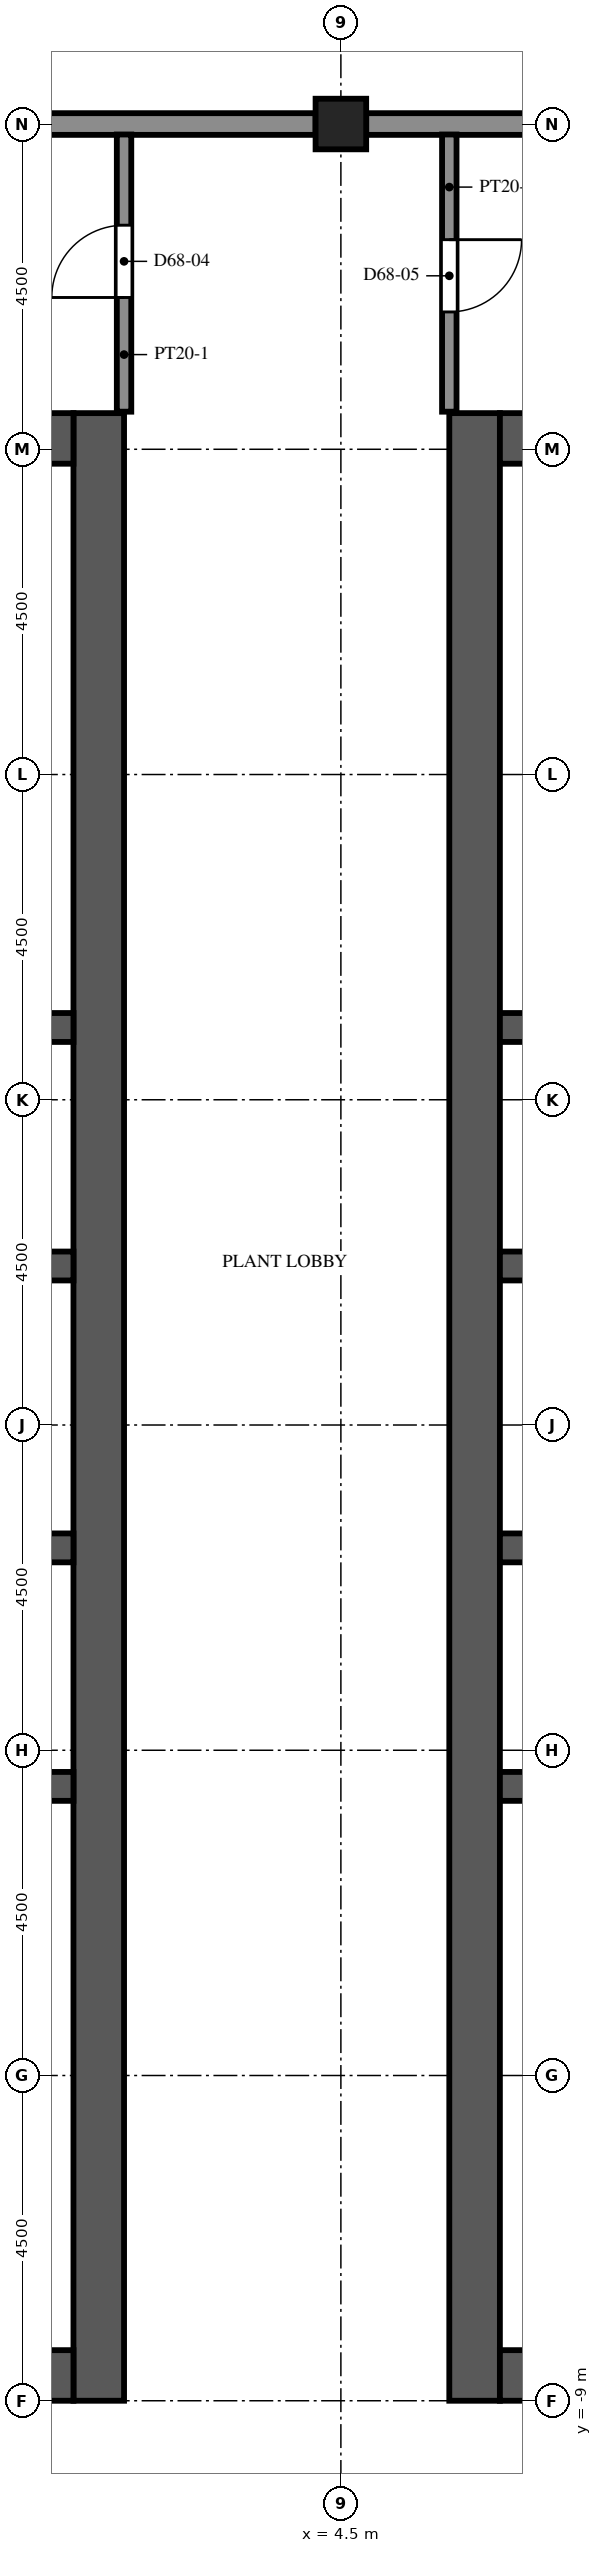
"""IFC4 building model, lengths in metres.
Left out: names, types, materials, properties, quantities, classifications, styles, units other than length and angle.
Written with IfcOpenShell. Run it as: python <this file> out.ifc"""

import sys

from ifc_helpers import new_model, si_unit, direction, frame, frame_2d, origin, origin_2d, place, context, subcontext, project, spatial, rectangle, extrude, element, fill, save


model = new_model("IFC4")
c1 = context("Model", 3, precision=1e-05, world=origin(), true_north=direction((0.0, 1.0)))
c2 = subcontext(c1, "Body", "Model", "MODEL_VIEW")
j1 = project(units=[si_unit("LENGTHUNIT", "METRE"), si_unit("PLANEANGLEUNIT", "RADIAN")], contexts=[c1])
p1 = place(None, origin())
s1 = spatial("IfcSite", under=j1, at=p1, CompositionType="ELEMENT")
p2 = place(p1, origin())
s2 = spatial("IfcBuilding", under=s1, at=p2, CompositionType="ELEMENT")
p3 = place(p2, frame((0.0, 0.0, 301.0)))
s3 = spatial("IfcBuildingStorey", under=s2, at=p3, CompositionType="ELEMENT", Elevation=301.0)
p4 = place(p3, frame((4.5, 22.5, -0.6), z_axis=(0.0, 0.0, 1.0), x_axis=(1.0, 0.0, 0.0)))
e1 = element("IfcColumn", 1, at=p4, inside=s3, PredefinedType="COLUMN", context=c2, shape_type="SweptSolid", body=[
    extrude(rectangle(XDim=0.7, YDim=0.7, at=origin_2d()), origin(), (0.0, 0.0, 1.0), 6.0),
])
p5 = place(p3, frame((1.15, -9.0, 0.0), z_axis=(0.0, 0.0, 1.0), x_axis=(0.0, 1.0, 0.0)))
e2 = element("IfcWall", 2, at=p5, inside=s3, PredefinedType="SHEAR", context=c2, shape_type="SweptSolid", body=[
    extrude(rectangle(XDim=27.5, YDim=0.7, at=frame_2d((13.75, 0.0))), origin(), (0.0, 0.0, 1.0), 5.4),
])
p6 = place(p5, frame((12.55, 0.0, 0.0)))
e3 = element("IfcOpeningElement", 3, at=p6, cuts=e2, PredefinedType="OPENING", context=c2, shape_type="SweptSolid", body=[
    extrude(rectangle(XDim=2.4, YDim=2.4, at=frame_2d((1.2, 1.2))), frame((0.0, 0.36, 0.0), z_axis=(0.0, -1.0, 0.0), x_axis=(1.0, 0.0, 0.0)), (0.0, 0.0, 1.0), 0.72),
])
p7 = place(p5, frame((5.46, 0.0, 0.0)))
e4 = element("IfcOpeningElement", 4, at=p7, cuts=e2, PredefinedType="OPENING", context=c2, shape_type="SweptSolid", body=[
    extrude(rectangle(XDim=0.968, YDim=2.1, at=frame_2d((0.484, 1.05))), frame((0.0, 0.36, 0.0), z_axis=(0.0, -1.0, 0.0), x_axis=(1.0, 0.0, 0.0)), (0.0, 0.0, 1.0), 0.72),
])
p8 = place(p5, frame((23.54, 0.0, 0.0)))
e5 = element("IfcOpeningElement", 5, at=p8, cuts=e2, PredefinedType="OPENING", context=c2, shape_type="SweptSolid", body=[
    extrude(rectangle(XDim=1.2, YDim=2.1, at=frame_2d((0.6, 1.05))), frame((0.0, 0.36, 0.0), z_axis=(0.0, -1.0, 0.0), x_axis=(1.0, 0.0, 0.0)), (0.0, 0.0, 1.0), 0.72),
])
for number, where, z_axis, x_axis in (
    (6, (-9.8, -8.65, 0.0), (0.0, 0.0, 1.0), (1.0, 0.0, 0.0)),
    (7, (-9.8, 18.15, 0.0), (0.0, 0.0, 1.0), (1.0, 0.0, 0.0)),
):
    element("IfcWall", number, at=place(p3, frame(where, z_axis=z_axis, x_axis=x_axis)), inside=s3, PredefinedType="SHEAR", context=c2, shape_type="SweptSolid", body=[
        extrude(rectangle(XDim=10.6, YDim=0.7, at=frame_2d((5.3, 0.0))), origin(), (0.0, 0.0, 1.0), 5.4),
    ])
p9 = place(p3, frame((-9.8, -0.5, 0.0), z_axis=(0.0, 0.0, 1.0), x_axis=(1.0, 0.0, 0.0)))
e8 = element("IfcWall", 8, at=p9, inside=s3, PredefinedType="SHEAR", context=c2, shape_type="SweptSolid", body=[
    extrude(rectangle(XDim=10.6, YDim=0.4, at=frame_2d((5.3, 0.0))), origin(), (0.0, 0.0, 1.0), 5.4),
])
p10 = place(p3, frame((-9.8, 2.8, 0.0), z_axis=(0.0, 0.0, 1.0), x_axis=(1.0, 0.0, 0.0)))
e9 = element("IfcWall", 9, at=p10, inside=s3, PredefinedType="SHEAR", context=c2, shape_type="SweptSolid", body=[
    extrude(rectangle(XDim=10.6, YDim=0.4, at=frame_2d((5.3, 0.0))), origin(), (0.0, 0.0, 1.0), 5.4),
])
p11 = place(p10, frame((0.688, 0.0, 0.0)))
e10 = element("IfcOpeningElement", 10, at=p11, cuts=e9, PredefinedType="OPENING", context=c2, shape_type="SweptSolid", body=[
    extrude(rectangle(XDim=1.1, YDim=2.1, at=frame_2d((0.55, 1.05))), frame((0.0, 0.21, 0.0), z_axis=(0.0, -1.0, 0.0), x_axis=(1.0, 0.0, 0.0)), (0.0, 0.0, 1.0), 0.42),
])
p12 = place(p10, frame((3.438, 0.0, 0.0)))
e11 = element("IfcOpeningElement", 11, at=p12, cuts=e9, PredefinedType="OPENING", context=c2, shape_type="SweptSolid", body=[
    extrude(rectangle(XDim=1.1, YDim=2.1, at=frame_2d((0.55, 1.05))), frame((0.0, 0.21, 0.0), z_axis=(0.0, -1.0, 0.0), x_axis=(1.0, 0.0, 0.0)), (0.0, 0.0, 1.0), 0.42),
])
p13 = place(p10, frame((6.113, 0.0, 0.0)))
e12 = element("IfcOpeningElement", 12, at=p13, cuts=e9, PredefinedType="OPENING", context=c2, shape_type="SweptSolid", body=[
    extrude(rectangle(XDim=1.0, YDim=2.1, at=frame_2d((0.5, 1.05))), frame((0.0, 0.21, 0.0), z_axis=(0.0, -1.0, 0.0), x_axis=(1.0, 0.0, 0.0)), (0.0, 0.0, 1.0), 0.42),
])
p14 = place(p10, frame((8.863, 0.0, 0.0)))
e13 = element("IfcOpeningElement", 13, at=p14, cuts=e9, PredefinedType="OPENING", context=c2, shape_type="SweptSolid", body=[
    extrude(rectangle(XDim=1.0, YDim=2.1, at=frame_2d((0.5, 1.05))), frame((0.0, 0.21, 0.0), z_axis=(0.0, -1.0, 0.0), x_axis=(1.0, 0.0, 0.0)), (0.0, 0.0, 1.0), 0.42),
])
p15 = place(p3, frame((-9.8, 6.7, 0.0), z_axis=(0.0, 0.0, 1.0), x_axis=(1.0, 0.0, 0.0)))
e14 = element("IfcWall", 14, at=p15, inside=s3, PredefinedType="SHEAR", context=c2, shape_type="SweptSolid", body=[
    extrude(rectangle(XDim=10.6, YDim=0.4, at=frame_2d((5.3, 0.0))), origin(), (0.0, 0.0, 1.0), 5.4),
])
p16 = place(p15, frame((0.738, 0.0, 0.0)))
e15 = element("IfcOpeningElement", 15, at=p16, cuts=e14, PredefinedType="OPENING", context=c2, shape_type="SweptSolid", body=[
    extrude(rectangle(XDim=1.0, YDim=2.1, at=frame_2d((0.5, 1.05))), frame((0.0, 0.21, 0.0), z_axis=(0.0, -1.0, 0.0), x_axis=(1.0, 0.0, 0.0)), (0.0, 0.0, 1.0), 0.42),
])
p17 = place(p15, frame((3.488, 0.0, 0.0)))
e16 = element("IfcOpeningElement", 16, at=p17, cuts=e14, PredefinedType="OPENING", context=c2, shape_type="SweptSolid", body=[
    extrude(rectangle(XDim=1.0, YDim=2.1, at=frame_2d((0.5, 1.05))), frame((0.0, 0.21, 0.0), z_axis=(0.0, -1.0, 0.0), x_axis=(1.0, 0.0, 0.0)), (0.0, 0.0, 1.0), 0.42),
])
p18 = place(p15, frame((6.113, 0.0, 0.0)))
e17 = element("IfcOpeningElement", 17, at=p18, cuts=e14, PredefinedType="OPENING", context=c2, shape_type="SweptSolid", body=[
    extrude(rectangle(XDim=1.0, YDim=2.1, at=frame_2d((0.5, 1.05))), frame((0.0, 0.21, 0.0), z_axis=(0.0, -1.0, 0.0), x_axis=(1.0, 0.0, 0.0)), (0.0, 0.0, 1.0), 0.42),
])
p19 = place(p15, frame((8.863, 0.0, 0.0)))
e18 = element("IfcOpeningElement", 18, at=p19, cuts=e14, PredefinedType="OPENING", context=c2, shape_type="SweptSolid", body=[
    extrude(rectangle(XDim=1.0, YDim=2.1, at=frame_2d((0.5, 1.05))), frame((0.0, 0.21, 0.0), z_axis=(0.0, -1.0, 0.0), x_axis=(1.0, 0.0, 0.0)), (0.0, 0.0, 1.0), 0.42),
])
p20 = place(p3, frame((-9.8, 10.0, 0.0), z_axis=(0.0, 0.0, 1.0), x_axis=(1.0, 0.0, 0.0)))
e19 = element("IfcWall", 19, at=p20, inside=s3, PredefinedType="SHEAR", context=c2, shape_type="SweptSolid", body=[
    extrude(rectangle(XDim=10.6, YDim=0.4, at=frame_2d((5.3, 0.0))), origin(), (0.0, 0.0, 1.0), 5.4),
])
p21 = place(p3, frame((6.35, -9.0, 0.0), z_axis=(0.0, 0.0, 1.0), x_axis=(0.0, 1.0, 0.0)))
e20 = element("IfcWall", 20, at=p21, inside=s3, PredefinedType="SHEAR", context=c2, shape_type="SweptSolid", body=[
    extrude(rectangle(XDim=27.5, YDim=0.7, at=frame_2d((13.75, 0.0))), origin(), (0.0, 0.0, 1.0), 5.4),
])
p22 = place(p21, frame((12.55, 0.0, 0.0)))
e21 = element("IfcOpeningElement", 21, at=p22, cuts=e20, PredefinedType="OPENING", context=c2, shape_type="SweptSolid", body=[
    extrude(rectangle(XDim=2.4, YDim=2.4, at=frame_2d((1.2, 1.2))), frame((0.0, 0.36, 0.0), z_axis=(0.0, -1.0, 0.0), x_axis=(1.0, 0.0, 0.0)), (0.0, 0.0, 1.0), 0.72),
])
p23 = place(p21, frame((3.9, 0.0, 0.0)))
e22 = element("IfcOpeningElement", 22, at=p23, cuts=e20, PredefinedType="OPENING", context=c2, shape_type="SweptSolid", body=[
    extrude(rectangle(XDim=1.2, YDim=2.1, at=frame_2d((0.6, 1.05))), frame((0.0, 0.36, 0.0), z_axis=(0.0, -1.0, 0.0), x_axis=(1.0, 0.0, 0.0)), (0.0, 0.0, 1.0), 0.72),
])
p24 = place(p21, frame((22.4, 0.0, 0.0)))
e23 = element("IfcOpeningElement", 23, at=p24, cuts=e20, PredefinedType="OPENING", context=c2, shape_type="SweptSolid", body=[
    extrude(rectangle(XDim=1.2, YDim=2.1, at=frame_2d((0.6, 1.05))), frame((0.0, 0.36, 0.0), z_axis=(0.0, -1.0, 0.0), x_axis=(1.0, 0.0, 0.0)), (0.0, 0.0, 1.0), 0.72),
])
for number, where, z_axis, x_axis in (
    (24, (6.7, -8.65, 0.0), (0.0, 0.0, 1.0), (1.0, 0.0, 0.0)),
    (25, (6.7, 18.15, 0.0), (0.0, 0.0, 1.0), (1.0, 0.0, 0.0)),
):
    element("IfcWall", number, at=place(p3, frame(where, z_axis=z_axis, x_axis=x_axis)), inside=s3, PredefinedType="SHEAR", context=c2, shape_type="SweptSolid", body=[
        extrude(rectangle(XDim=10.6, YDim=0.7, at=frame_2d((5.3, 0.0))), origin(), (0.0, 0.0, 1.0), 5.4),
    ])
p25 = place(p3, frame((6.7, -0.5, 0.0), z_axis=(0.0, 0.0, 1.0), x_axis=(1.0, 0.0, 0.0)))
e26 = element("IfcWall", 26, at=p25, inside=s3, PredefinedType="SHEAR", context=c2, shape_type="SweptSolid", body=[
    extrude(rectangle(XDim=10.6, YDim=0.4, at=frame_2d((5.3, 0.0))), origin(), (0.0, 0.0, 1.0), 5.4),
])
p26 = place(p3, frame((6.7, 2.8, 0.0), z_axis=(0.0, 0.0, 1.0), x_axis=(1.0, 0.0, 0.0)))
e27 = element("IfcWall", 27, at=p26, inside=s3, PredefinedType="SHEAR", context=c2, shape_type="SweptSolid", body=[
    extrude(rectangle(XDim=10.6, YDim=0.4, at=frame_2d((5.3, 0.0))), origin(), (0.0, 0.0, 1.0), 5.4),
])
p27 = place(p26, frame((0.688, 0.0, 0.0)))
e28 = element("IfcOpeningElement", 28, at=p27, cuts=e27, PredefinedType="OPENING", context=c2, shape_type="SweptSolid", body=[
    extrude(rectangle(XDim=1.1, YDim=2.1, at=frame_2d((0.55, 1.05))), frame((0.0, 0.21, 0.0), z_axis=(0.0, -1.0, 0.0), x_axis=(1.0, 0.0, 0.0)), (0.0, 0.0, 1.0), 0.42),
])
p28 = place(p26, frame((3.438, 0.0, 0.0)))
e29 = element("IfcOpeningElement", 29, at=p28, cuts=e27, PredefinedType="OPENING", context=c2, shape_type="SweptSolid", body=[
    extrude(rectangle(XDim=1.1, YDim=2.1, at=frame_2d((0.55, 1.05))), frame((0.0, 0.21, 0.0), z_axis=(0.0, -1.0, 0.0), x_axis=(1.0, 0.0, 0.0)), (0.0, 0.0, 1.0), 0.42),
])
p29 = place(p26, frame((6.113, 0.0, 0.0)))
e30 = element("IfcOpeningElement", 30, at=p29, cuts=e27, PredefinedType="OPENING", context=c2, shape_type="SweptSolid", body=[
    extrude(rectangle(XDim=1.0, YDim=2.1, at=frame_2d((0.5, 1.05))), frame((0.0, 0.21, 0.0), z_axis=(0.0, -1.0, 0.0), x_axis=(1.0, 0.0, 0.0)), (0.0, 0.0, 1.0), 0.42),
])
p30 = place(p26, frame((8.863, 0.0, 0.0)))
e31 = element("IfcOpeningElement", 31, at=p30, cuts=e27, PredefinedType="OPENING", context=c2, shape_type="SweptSolid", body=[
    extrude(rectangle(XDim=1.0, YDim=2.1, at=frame_2d((0.5, 1.05))), frame((0.0, 0.21, 0.0), z_axis=(0.0, -1.0, 0.0), x_axis=(1.0, 0.0, 0.0)), (0.0, 0.0, 1.0), 0.42),
])
p31 = place(p3, frame((6.7, 6.7, 0.0), z_axis=(0.0, 0.0, 1.0), x_axis=(1.0, 0.0, 0.0)))
e32 = element("IfcWall", 32, at=p31, inside=s3, PredefinedType="SHEAR", context=c2, shape_type="SweptSolid", body=[
    extrude(rectangle(XDim=10.6, YDim=0.4, at=frame_2d((5.3, 0.0))), origin(), (0.0, 0.0, 1.0), 5.4),
])
p32 = place(p31, frame((0.738, 0.0, 0.0)))
e33 = element("IfcOpeningElement", 33, at=p32, cuts=e32, PredefinedType="OPENING", context=c2, shape_type="SweptSolid", body=[
    extrude(rectangle(XDim=1.0, YDim=2.1, at=frame_2d((0.5, 1.05))), frame((0.0, 0.21, 0.0), z_axis=(0.0, -1.0, 0.0), x_axis=(1.0, 0.0, 0.0)), (0.0, 0.0, 1.0), 0.42),
])
p33 = place(p31, frame((3.488, 0.0, 0.0)))
e34 = element("IfcOpeningElement", 34, at=p33, cuts=e32, PredefinedType="OPENING", context=c2, shape_type="SweptSolid", body=[
    extrude(rectangle(XDim=1.0, YDim=2.1, at=frame_2d((0.5, 1.05))), frame((0.0, 0.21, 0.0), z_axis=(0.0, -1.0, 0.0), x_axis=(1.0, 0.0, 0.0)), (0.0, 0.0, 1.0), 0.42),
])
p34 = place(p31, frame((6.113, 0.0, 0.0)))
e35 = element("IfcOpeningElement", 35, at=p34, cuts=e32, PredefinedType="OPENING", context=c2, shape_type="SweptSolid", body=[
    extrude(rectangle(XDim=1.0, YDim=2.1, at=frame_2d((0.5, 1.05))), frame((0.0, 0.21, 0.0), z_axis=(0.0, -1.0, 0.0), x_axis=(1.0, 0.0, 0.0)), (0.0, 0.0, 1.0), 0.42),
])
p35 = place(p31, frame((8.863, 0.0, 0.0)))
e36 = element("IfcOpeningElement", 36, at=p35, cuts=e32, PredefinedType="OPENING", context=c2, shape_type="SweptSolid", body=[
    extrude(rectangle(XDim=1.0, YDim=2.1, at=frame_2d((0.5, 1.05))), frame((0.0, 0.21, 0.0), z_axis=(0.0, -1.0, 0.0), x_axis=(1.0, 0.0, 0.0)), (0.0, 0.0, 1.0), 0.42),
])
p36 = place(p3, frame((6.7, 10.0, 0.0), z_axis=(0.0, 0.0, 1.0), x_axis=(1.0, 0.0, 0.0)))
e37 = element("IfcWall", 37, at=p36, inside=s3, PredefinedType="SHEAR", context=c2, shape_type="SweptSolid", body=[
    extrude(rectangle(XDim=10.6, YDim=0.4, at=frame_2d((5.3, 0.0))), origin(), (0.0, 0.0, 1.0), 5.4),
])
for number, where, z_axis, x_axis in (
    (38, (8.65, 22.5, 0.0), (0.0, 0.0, 1.0), (-1.0, 0.0, 0.0)),
    (39, (4.15, 22.5, 0.0), (0.0, 0.0, 1.0), (-1.0, 0.0, 0.0)),
):
    element("IfcWall", number, at=place(p3, frame(where, z_axis=z_axis, x_axis=x_axis)), inside=s3, PredefinedType="SOLIDWALL", context=c2, shape_type="SweptSolid", body=[
        extrude(rectangle(XDim=3.8, YDim=0.3, at=frame_2d((1.9, 0.0))), origin(), (0.0, 0.0, 1.0), 0.85),
    ])
p37 = place(p3, frame((1.5, 18.52, 0.0), z_axis=(0.0, 0.0, 1.0), x_axis=(0.0, 1.0, 0.0)))
e40 = element("IfcWall", 40, at=p37, inside=s3, PredefinedType="PARTITIONING", context=c2, shape_type="SweptSolid", body=[
    extrude(rectangle(XDim=3.835, YDim=0.2, at=frame_2d((1.917, 0.0))), origin(), (0.0, 0.0, 1.0), 4.8),
])
p38 = place(p37, frame((1.58, 0.0, 0.0)))
e41 = element("IfcOpeningElement", 41, at=p38, cuts=e40, PredefinedType="OPENING", context=c2, shape_type="SweptSolid", body=[
    extrude(rectangle(XDim=1.0, YDim=2.1, at=frame_2d((0.5, 1.05))), frame((0.0, 0.11, 0.0), z_axis=(0.0, -1.0, 0.0), x_axis=(1.0, 0.0, 0.0)), (0.0, 0.0, 1.0), 0.22),
])
p39 = place(p3, frame((6.0, 22.355, 0.0), z_axis=(0.0, 0.0, 1.0), x_axis=(0.0, -1.0, 0.0)))
e42 = element("IfcWall", 42, at=p39, inside=s3, PredefinedType="PARTITIONING", context=c2, shape_type="SweptSolid", body=[
    extrude(rectangle(XDim=3.835, YDim=0.2, at=frame_2d((1.917, 0.0))), origin(), (0.0, 0.0, 1.0), 4.8),
])
p40 = place(p39, frame((1.455, 0.0, 0.0)))
e43 = element("IfcOpeningElement", 43, at=p40, cuts=e42, PredefinedType="OPENING", context=c2, shape_type="SweptSolid", body=[
    extrude(rectangle(XDim=1.0, YDim=2.1, at=frame_2d((0.5, 1.05))), frame((0.0, 0.11, 0.0), z_axis=(0.0, -1.0, 0.0), x_axis=(1.0, 0.0, 0.0)), (0.0, 0.0, 1.0), 0.22),
])
p41 = place(p3, frame((-1.75, -3.74, 0.0), z_axis=(0.0, 0.0, 1.0), x_axis=(1.0, 0.0, 0.0)))
e44 = element("IfcWall", 44, at=p41, inside=s3, PredefinedType="PARTITIONING", context=c2, shape_type="SweptSolid", body=[
    extrude(rectangle(XDim=2.55, YDim=0.1, at=frame_2d((1.275, 0.0))), origin(), (0.0, 0.0, 1.0), 4.8),
])
p42 = place(p41, frame((0.775, 0.0, 0.0)))
e45 = element("IfcOpeningElement", 45, at=p42, cuts=e44, PredefinedType="OPENING", context=c2, shape_type="SweptSolid", body=[
    extrude(rectangle(XDim=1.0, YDim=2.1, at=frame_2d((0.5, 1.05))), frame((0.0, 0.06, 0.0), z_axis=(0.0, -1.0, 0.0), x_axis=(1.0, 0.0, 0.0)), (0.0, 0.0, 1.0), 0.12),
])
p43 = place(p3, frame((-1.75, -2.372, 0.0), z_axis=(0.0, 0.0, 1.0), x_axis=(1.0, 0.0, 0.0)))
e46 = element("IfcWall", 46, at=p43, inside=s3, PredefinedType="PARTITIONING", context=c2, shape_type="SweptSolid", body=[
    extrude(rectangle(XDim=2.55, YDim=0.1, at=frame_2d((1.275, 0.0))), origin(), (0.0, 0.0, 1.0), 4.8),
])
p44 = place(p43, frame((0.775, 0.0, 0.0)))
e47 = element("IfcOpeningElement", 47, at=p44, cuts=e46, PredefinedType="OPENING", context=c2, shape_type="SweptSolid", body=[
    extrude(rectangle(XDim=1.0, YDim=2.1, at=frame_2d((0.5, 1.05))), frame((0.0, 0.06, 0.0), z_axis=(0.0, -1.0, 0.0), x_axis=(1.0, 0.0, 0.0)), (0.0, 0.0, 1.0), 0.12),
])
p45 = place(p3, frame((-0.5, 12.48, 0.0), z_axis=(0.0, 0.0, 1.0), x_axis=(1.0, 0.0, 0.0)))
e48 = element("IfcWall", 48, at=p45, inside=s3, PredefinedType="PARTITIONING", context=c2, shape_type="SweptSolid", body=[
    extrude(rectangle(XDim=1.3, YDim=0.1, at=frame_2d((0.65, 0.0))), origin(), (0.0, 0.0, 1.0), 4.8),
])
p46 = place(p45, frame((0.2, 0.0, 0.0)))
e49 = element("IfcOpeningElement", 49, at=p46, cuts=e48, PredefinedType="OPENING", context=c2, shape_type="SweptSolid", body=[
    extrude(rectangle(XDim=0.9, YDim=2.1, at=frame_2d((0.45, 1.05))), frame((0.0, 0.06, 0.0), z_axis=(0.0, -1.0, 0.0), x_axis=(1.0, 0.0, 0.0)), (0.0, 0.0, 1.0), 0.12),
])
p47 = place(p38, origin())
e50 = element("IfcDoor", 50, at=p47, inside=s3, OperationType="SINGLE_SWING_LEFT", PredefinedType="DOOR", context=c2, shape_type="SweptSolid", body=[
    extrude(rectangle(XDim=1.0, YDim=2.1, at=frame_2d((0.5, 1.05))), frame((0.0, 0.025, 0.0), z_axis=(0.0, -1.0, 0.0), x_axis=(1.0, 0.0, 0.0)), (0.0, 0.0, 1.0), 0.05),
])
fill(e41, e50)
p48 = place(p40, origin())
e51 = element("IfcDoor", 51, at=p48, inside=s3, OperationType="SINGLE_SWING_LEFT", PredefinedType="DOOR", context=c2, shape_type="SweptSolid", body=[
    extrude(rectangle(XDim=1.0, YDim=2.1, at=frame_2d((0.5, 1.05))), frame((0.0, 0.025, 0.0), z_axis=(0.0, -1.0, 0.0), x_axis=(1.0, 0.0, 0.0)), (0.0, 0.0, 1.0), 0.05),
])
fill(e43, e51)
p49 = place(p6, origin())
e52 = element("IfcDoor", 52, at=p49, inside=s3, OperationType="DOUBLE_DOOR_DOUBLE_SWING", PredefinedType="DOOR", context=c2, shape_type="SweptSolid", body=[
    extrude(rectangle(XDim=2.4, YDim=2.4, at=frame_2d((1.2, 1.2))), frame((0.0, 0.025, 0.0), z_axis=(0.0, -1.0, 0.0), x_axis=(1.0, 0.0, 0.0)), (0.0, 0.0, 1.0), 0.05),
])
fill(e3, e52)
p50 = place(p22, origin())
e53 = element("IfcDoor", 53, at=p50, inside=s3, OperationType="DOUBLE_DOOR_DOUBLE_SWING", PredefinedType="DOOR", context=c2, shape_type="SweptSolid", body=[
    extrude(rectangle(XDim=2.4, YDim=2.4, at=frame_2d((1.2, 1.2))), frame((0.0, 0.025, 0.0), z_axis=(0.0, -1.0, 0.0), x_axis=(1.0, 0.0, 0.0)), (0.0, 0.0, 1.0), 0.05),
])
fill(e21, e53)
p51 = place(p7, origin())
e54 = element("IfcDoor", 54, at=p51, inside=s3, OperationType="SINGLE_SWING_LEFT", PredefinedType="DOOR", context=c2, shape_type="SweptSolid", body=[
    extrude(rectangle(XDim=0.968, YDim=2.1, at=frame_2d((0.484, 1.05))), frame((0.0, 0.325, 0.0), z_axis=(0.0, -1.0, 0.0), x_axis=(1.0, 0.0, 0.0)), (0.0, 0.0, 1.0), 0.05),
])
fill(e4, e54)
p52 = place(p46, origin())
e55 = element("IfcDoor", 55, at=p52, inside=s3, OperationType="SINGLE_SWING_LEFT", PredefinedType="DOOR", context=c2, shape_type="SweptSolid", body=[
    extrude(rectangle(XDim=0.9, YDim=2.1, at=frame_2d((0.45, 1.05))), frame((0.0, 0.025, 0.0), z_axis=(0.0, -1.0, 0.0), x_axis=(1.0, 0.0, 0.0)), (0.0, 0.0, 1.0), 0.05),
])
fill(e49, e55)
p53 = place(p8, origin())
e56 = element("IfcDoor", 56, at=p53, inside=s3, OperationType="SINGLE_SWING_RIGHT", PredefinedType="DOOR", context=c2, shape_type="SweptSolid", body=[
    extrude(rectangle(XDim=1.2, YDim=2.1, at=frame_2d((0.6, 1.05))), frame((0.0, 0.325, 0.0), z_axis=(0.0, -1.0, 0.0), x_axis=(1.0, 0.0, 0.0)), (0.0, 0.0, 1.0), 0.05),
])
fill(e5, e56)
p54 = place(p23, origin())
e57 = element("IfcDoor", 57, at=p54, inside=s3, OperationType="SINGLE_SWING_RIGHT", PredefinedType="DOOR", context=c2, shape_type="SweptSolid", body=[
    extrude(rectangle(XDim=1.2, YDim=2.1, at=frame_2d((0.6, 1.05))), frame((0.0, -0.275, 0.0), z_axis=(0.0, -1.0, 0.0), x_axis=(1.0, 0.0, 0.0)), (0.0, 0.0, 1.0), 0.05),
])
fill(e22, e57)
p55 = place(p24, origin())
e58 = element("IfcDoor", 58, at=p55, inside=s3, OperationType="SINGLE_SWING_RIGHT", PredefinedType="DOOR", context=c2, shape_type="SweptSolid", body=[
    extrude(rectangle(XDim=1.2, YDim=2.1, at=frame_2d((0.6, 1.05))), frame((0.0, -0.275, 0.0), z_axis=(0.0, -1.0, 0.0), x_axis=(1.0, 0.0, 0.0)), (0.0, 0.0, 1.0), 0.05),
])
fill(e23, e58)
save(model, sys.argv[1])
